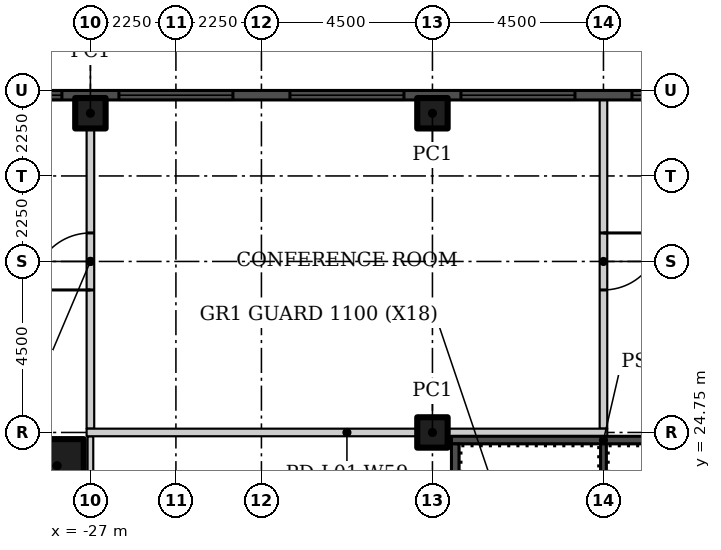
"""IFC4 building model, lengths in metres.
Left out: names, types, materials, properties, quantities, classifications, styles, units other than length and angle.
Written with IfcOpenShell. Run it as: python <this file> out.ifc"""

import sys

from ifc_helpers import new_model, si_unit, direction, frame, frame_2d, origin, origin_2d, place, context, subcontext, project, spatial, rectangle, hollow_rectangle, extrude, element, fill, save


model = new_model("IFC4")
c1 = context("Model", 3, precision=1e-05, world=origin(), true_north=direction((0.0, 1.0)))
c2 = subcontext(c1, "Body", "Model", "MODEL_VIEW")
j1 = project(units=[si_unit("LENGTHUNIT", "METRE"), si_unit("PLANEANGLEUNIT", "RADIAN")], contexts=[c1])
p1 = place(None, origin())
s1 = spatial("IfcSite", under=j1, at=p1, CompositionType="ELEMENT")
p2 = place(p1, origin())
s2 = spatial("IfcBuilding", under=s1, at=p2, CompositionType="ELEMENT")
p3 = place(p2, frame((0.0, 0.0, 6.5)))
s3 = spatial("IfcBuildingStorey", under=s2, at=p3, CompositionType="ELEMENT", Elevation=6.5)
p4 = place(p3, frame((-27.875, 23.875, 0.0)))
e1 = element("IfcColumn", 1, at=p4, inside=s3, PredefinedType="COLUMN", context=c2, shape_type="SweptSolid", body=[
    extrude(hollow_rectangle(XDim=1.4, YDim=1.4, WallThickness=0.06, at=origin_2d()), origin(), (0.0, 0.0, 1.0), 5.6),
])
for number, where in (
    (2, (-27.0, 33.15, 0.0)),
    (3, (-18.0, 24.75, 0.0)),
    (4, (-18.0, 33.15, 0.0)),
):
    element("IfcColumn", number, at=place(p3, frame(where)), inside=s3, PredefinedType="COLUMN", context=c2, shape_type="SweptSolid", body=[
        extrude(hollow_rectangle(XDim=0.8, YDim=0.8, WallThickness=0.03, at=origin_2d()), origin(), (0.0, 0.0, 1.0), 5.6),
    ])
p5 = place(p3, frame((-27.0, 6.75, 0.0), z_axis=(0.0, 0.0, 1.0), x_axis=(0.0, 1.0, 0.0)))
e5 = element("IfcWall", 5, at=p5, inside=s3, PredefinedType="PARTITIONING", context=c2, shape_type="SweptSolid", body=[
    extrude(rectangle(XDim=17.9, YDim=0.15, at=frame_2d((8.95, 0.0))), origin(), (0.0, 0.0, 1.0), 5.6),
])
p6 = place(p5, frame((2.1, 0.0, 0.0)))
e6 = element("IfcOpeningElement", 6, at=p6, cuts=e5, PredefinedType="OPENING", context=c2, shape_type="SweptSolid", body=[
    extrude(rectangle(XDim=1.5, YDim=2.1, at=frame_2d((0.75, 1.05))), frame((0.0, 0.085, 0.0), z_axis=(0.0, -1.0, 0.0), x_axis=(1.0, 0.0, 0.0)), (0.0, 0.0, 1.0), 0.17),
])
p7 = place(p5, frame((14.85, 0.0, 0.0)))
e7 = element("IfcOpeningElement", 7, at=p7, cuts=e5, PredefinedType="OPENING", context=c2, shape_type="SweptSolid", body=[
    extrude(rectangle(XDim=1.5, YDim=2.1, at=frame_2d((0.75, 1.05))), frame((0.0, 0.085, 0.0), z_axis=(0.0, -1.0, 0.0), x_axis=(1.0, 0.0, 0.0)), (0.0, 0.0, 1.0), 0.17),
])
p8 = place(p3, frame((-27.0, 24.85, 0.0), z_axis=(0.0, 0.0, 1.0), x_axis=(0.0, 1.0, 0.0)))
e8 = element("IfcWall", 8, at=p8, inside=s3, PredefinedType="PARTITIONING", context=c2, shape_type="SweptSolid", body=[
    extrude(rectangle(XDim=8.805, YDim=0.2, at=frame_2d((4.402, 0.0))), origin(), (0.0, 0.0, 1.0), 5.6),
])
p9 = place(p8, frame((3.65, 0.0, 0.0)))
e9 = element("IfcOpeningElement", 9, at=p9, cuts=e8, PredefinedType="OPENING", context=c2, shape_type="SweptSolid", body=[
    extrude(rectangle(XDim=1.5, YDim=2.4, at=frame_2d((0.75, 1.2))), frame((0.0, 0.11, 0.0), z_axis=(0.0, -1.0, 0.0), x_axis=(1.0, 0.0, 0.0)), (0.0, 0.0, 1.0), 0.22),
])
p10 = place(p3, frame((-13.5, 33.655, 0.0), z_axis=(0.0, 0.0, 1.0), x_axis=(0.0, -1.0, 0.0)))
e10 = element("IfcWall", 10, at=p10, inside=s3, PredefinedType="PARTITIONING", context=c2, shape_type="SweptSolid", body=[
    extrude(rectangle(XDim=8.805, YDim=0.2, at=frame_2d((4.402, 0.0))), origin(), (0.0, 0.0, 1.0), 5.6),
])
p11 = place(p10, frame((3.655, 0.0, 0.0)))
e11 = element("IfcOpeningElement", 11, at=p11, cuts=e10, PredefinedType="OPENING", context=c2, shape_type="SweptSolid", body=[
    extrude(rectangle(XDim=1.5, YDim=2.4, at=frame_2d((0.75, 1.2))), frame((0.0, 0.11, 0.0), z_axis=(0.0, -1.0, 0.0), x_axis=(1.0, 0.0, 0.0)), (0.0, 0.0, 1.0), 0.22),
])
p12 = place(p3, frame((-13.4, 24.75, 0.0), z_axis=(0.0, 0.0, 1.0), x_axis=(-1.0, 0.0, 0.0)))
e12 = element("IfcWall", 12, at=p12, inside=s3, PredefinedType="PARTITIONING", context=c2, shape_type="SweptSolid", body=[
    extrude(rectangle(XDim=13.7, YDim=0.2, at=frame_2d((6.85, 0.0))), origin(), (0.0, 0.0, 1.0), 5.6),
])
p13 = place(p3, frame((-67.5, 33.625, -0.35)))
e13 = element("IfcWall", 13, at=p13, inside=s3, PredefinedType="SOLIDWALL", context=c2, shape_type="SweptSolid", body=[
    extrude(rectangle(XDim=130.5, YDim=0.25, at=frame_2d((65.25, 0.0))), origin(), (0.0, 0.0, 1.0), 6.0),
])
p14 = place(p13, frame((126.75, 0.0, 1.35)))
e14 = element("IfcOpeningElement", 14, at=p14, cuts=e13, PredefinedType="OPENING", context=c2, shape_type="SweptSolid", body=[
    extrude(rectangle(XDim=3.0, YDim=1.8, at=frame_2d((1.5, 0.9))), frame((0.0, 0.135, 0.0), z_axis=(0.0, -1.0, 0.0), x_axis=(1.0, 0.0, 0.0)), (0.0, 0.0, 1.0), 0.27),
])
p15 = place(p13, frame((122.25, 0.0, 1.35)))
e15 = element("IfcOpeningElement", 15, at=p15, cuts=e13, PredefinedType="OPENING", context=c2, shape_type="SweptSolid", body=[
    extrude(rectangle(XDim=3.0, YDim=1.8, at=frame_2d((1.5, 0.9))), frame((0.0, 0.135, 0.0), z_axis=(0.0, -1.0, 0.0), x_axis=(1.0, 0.0, 0.0)), (0.0, 0.0, 1.0), 0.27),
])
p16 = place(p13, frame((117.75, 0.0, 1.35)))
e16 = element("IfcOpeningElement", 16, at=p16, cuts=e13, PredefinedType="OPENING", context=c2, shape_type="SweptSolid", body=[
    extrude(rectangle(XDim=3.0, YDim=1.8, at=frame_2d((1.5, 0.9))), frame((0.0, 0.135, 0.0), z_axis=(0.0, -1.0, 0.0), x_axis=(1.0, 0.0, 0.0)), (0.0, 0.0, 1.0), 0.27),
])
p17 = place(p13, frame((113.25, 0.0, 1.35)))
e17 = element("IfcOpeningElement", 17, at=p17, cuts=e13, PredefinedType="OPENING", context=c2, shape_type="SweptSolid", body=[
    extrude(rectangle(XDim=3.0, YDim=1.8, at=frame_2d((1.5, 0.9))), frame((0.0, 0.135, 0.0), z_axis=(0.0, -1.0, 0.0), x_axis=(1.0, 0.0, 0.0)), (0.0, 0.0, 1.0), 0.27),
])
p18 = place(p13, frame((108.75, 0.0, 1.35)))
e18 = element("IfcOpeningElement", 18, at=p18, cuts=e13, PredefinedType="OPENING", context=c2, shape_type="SweptSolid", body=[
    extrude(rectangle(XDim=3.0, YDim=1.8, at=frame_2d((1.5, 0.9))), frame((0.0, 0.135, 0.0), z_axis=(0.0, -1.0, 0.0), x_axis=(1.0, 0.0, 0.0)), (0.0, 0.0, 1.0), 0.27),
])
p19 = place(p13, frame((104.25, 0.0, 1.35)))
e19 = element("IfcOpeningElement", 19, at=p19, cuts=e13, PredefinedType="OPENING", context=c2, shape_type="SweptSolid", body=[
    extrude(rectangle(XDim=3.0, YDim=1.8, at=frame_2d((1.5, 0.9))), frame((0.0, 0.135, 0.0), z_axis=(0.0, -1.0, 0.0), x_axis=(1.0, 0.0, 0.0)), (0.0, 0.0, 1.0), 0.27),
])
p20 = place(p13, frame((99.75, 0.0, 1.35)))
e20 = element("IfcOpeningElement", 20, at=p20, cuts=e13, PredefinedType="OPENING", context=c2, shape_type="SweptSolid", body=[
    extrude(rectangle(XDim=3.0, YDim=1.8, at=frame_2d((1.5, 0.9))), frame((0.0, 0.135, 0.0), z_axis=(0.0, -1.0, 0.0), x_axis=(1.0, 0.0, 0.0)), (0.0, 0.0, 1.0), 0.27),
])
p21 = place(p13, frame((95.25, 0.0, 1.35)))
e21 = element("IfcOpeningElement", 21, at=p21, cuts=e13, PredefinedType="OPENING", context=c2, shape_type="SweptSolid", body=[
    extrude(rectangle(XDim=3.0, YDim=1.8, at=frame_2d((1.5, 0.9))), frame((0.0, 0.135, 0.0), z_axis=(0.0, -1.0, 0.0), x_axis=(1.0, 0.0, 0.0)), (0.0, 0.0, 1.0), 0.27),
])
p22 = place(p13, frame((90.75, 0.0, 1.35)))
e22 = element("IfcOpeningElement", 22, at=p22, cuts=e13, PredefinedType="OPENING", context=c2, shape_type="SweptSolid", body=[
    extrude(rectangle(XDim=3.0, YDim=1.8, at=frame_2d((1.5, 0.9))), frame((0.0, 0.135, 0.0), z_axis=(0.0, -1.0, 0.0), x_axis=(1.0, 0.0, 0.0)), (0.0, 0.0, 1.0), 0.27),
])
p23 = place(p13, frame((86.25, 0.0, 1.35)))
e23 = element("IfcOpeningElement", 23, at=p23, cuts=e13, PredefinedType="OPENING", context=c2, shape_type="SweptSolid", body=[
    extrude(rectangle(XDim=3.0, YDim=1.8, at=frame_2d((1.5, 0.9))), frame((0.0, 0.135, 0.0), z_axis=(0.0, -1.0, 0.0), x_axis=(1.0, 0.0, 0.0)), (0.0, 0.0, 1.0), 0.27),
])
p24 = place(p13, frame((81.75, 0.0, 1.35)))
e24 = element("IfcOpeningElement", 24, at=p24, cuts=e13, PredefinedType="OPENING", context=c2, shape_type="SweptSolid", body=[
    extrude(rectangle(XDim=3.0, YDim=1.8, at=frame_2d((1.5, 0.9))), frame((0.0, 0.135, 0.0), z_axis=(0.0, -1.0, 0.0), x_axis=(1.0, 0.0, 0.0)), (0.0, 0.0, 1.0), 0.27),
])
p25 = place(p13, frame((77.25, 0.0, 1.35)))
e25 = element("IfcOpeningElement", 25, at=p25, cuts=e13, PredefinedType="OPENING", context=c2, shape_type="SweptSolid", body=[
    extrude(rectangle(XDim=3.0, YDim=1.8, at=frame_2d((1.5, 0.9))), frame((0.0, 0.135, 0.0), z_axis=(0.0, -1.0, 0.0), x_axis=(1.0, 0.0, 0.0)), (0.0, 0.0, 1.0), 0.27),
])
p26 = place(p13, frame((72.75, 0.0, 1.35)))
e26 = element("IfcOpeningElement", 26, at=p26, cuts=e13, PredefinedType="OPENING", context=c2, shape_type="SweptSolid", body=[
    extrude(rectangle(XDim=3.0, YDim=1.8, at=frame_2d((1.5, 0.9))), frame((0.0, 0.135, 0.0), z_axis=(0.0, -1.0, 0.0), x_axis=(1.0, 0.0, 0.0)), (0.0, 0.0, 1.0), 0.27),
])
p27 = place(p13, frame((68.25, 0.0, 1.35)))
e27 = element("IfcOpeningElement", 27, at=p27, cuts=e13, PredefinedType="OPENING", context=c2, shape_type="SweptSolid", body=[
    extrude(rectangle(XDim=3.0, YDim=1.8, at=frame_2d((1.5, 0.9))), frame((0.0, 0.135, 0.0), z_axis=(0.0, -1.0, 0.0), x_axis=(1.0, 0.0, 0.0)), (0.0, 0.0, 1.0), 0.27),
])
p28 = place(p13, frame((63.75, 0.0, 1.35)))
e28 = element("IfcOpeningElement", 28, at=p28, cuts=e13, PredefinedType="OPENING", context=c2, shape_type="SweptSolid", body=[
    extrude(rectangle(XDim=3.0, YDim=1.8, at=frame_2d((1.5, 0.9))), frame((0.0, 0.135, 0.0), z_axis=(0.0, -1.0, 0.0), x_axis=(1.0, 0.0, 0.0)), (0.0, 0.0, 1.0), 0.27),
])
p29 = place(p13, frame((59.25, 0.0, 1.35)))
e29 = element("IfcOpeningElement", 29, at=p29, cuts=e13, PredefinedType="OPENING", context=c2, shape_type="SweptSolid", body=[
    extrude(rectangle(XDim=3.0, YDim=1.8, at=frame_2d((1.5, 0.9))), frame((0.0, 0.135, 0.0), z_axis=(0.0, -1.0, 0.0), x_axis=(1.0, 0.0, 0.0)), (0.0, 0.0, 1.0), 0.27),
])
p30 = place(p13, frame((54.75, 0.0, 1.35)))
e30 = element("IfcOpeningElement", 30, at=p30, cuts=e13, PredefinedType="OPENING", context=c2, shape_type="SweptSolid", body=[
    extrude(rectangle(XDim=3.0, YDim=1.8, at=frame_2d((1.5, 0.9))), frame((0.0, 0.135, 0.0), z_axis=(0.0, -1.0, 0.0), x_axis=(1.0, 0.0, 0.0)), (0.0, 0.0, 1.0), 0.27),
])
p31 = place(p13, frame((50.25, 0.0, 1.35)))
e31 = element("IfcOpeningElement", 31, at=p31, cuts=e13, PredefinedType="OPENING", context=c2, shape_type="SweptSolid", body=[
    extrude(rectangle(XDim=3.0, YDim=1.8, at=frame_2d((1.5, 0.9))), frame((0.0, 0.135, 0.0), z_axis=(0.0, -1.0, 0.0), x_axis=(1.0, 0.0, 0.0)), (0.0, 0.0, 1.0), 0.27),
])
p32 = place(p13, frame((45.75, 0.0, 1.35)))
e32 = element("IfcOpeningElement", 32, at=p32, cuts=e13, PredefinedType="OPENING", context=c2, shape_type="SweptSolid", body=[
    extrude(rectangle(XDim=3.0, YDim=1.8, at=frame_2d((1.5, 0.9))), frame((0.0, 0.135, 0.0), z_axis=(0.0, -1.0, 0.0), x_axis=(1.0, 0.0, 0.0)), (0.0, 0.0, 1.0), 0.27),
])
p33 = place(p13, frame((41.25, 0.0, 1.35)))
e33 = element("IfcOpeningElement", 33, at=p33, cuts=e13, PredefinedType="OPENING", context=c2, shape_type="SweptSolid", body=[
    extrude(rectangle(XDim=3.0, YDim=1.8, at=frame_2d((1.5, 0.9))), frame((0.0, 0.135, 0.0), z_axis=(0.0, -1.0, 0.0), x_axis=(1.0, 0.0, 0.0)), (0.0, 0.0, 1.0), 0.27),
])
p34 = place(p13, frame((36.75, 0.0, 1.35)))
e34 = element("IfcOpeningElement", 34, at=p34, cuts=e13, PredefinedType="OPENING", context=c2, shape_type="SweptSolid", body=[
    extrude(rectangle(XDim=3.0, YDim=1.8, at=frame_2d((1.5, 0.9))), frame((0.0, 0.135, 0.0), z_axis=(0.0, -1.0, 0.0), x_axis=(1.0, 0.0, 0.0)), (0.0, 0.0, 1.0), 0.27),
])
p35 = place(p13, frame((32.25, 0.0, 1.35)))
e35 = element("IfcOpeningElement", 35, at=p35, cuts=e13, PredefinedType="OPENING", context=c2, shape_type="SweptSolid", body=[
    extrude(rectangle(XDim=3.0, YDim=1.8, at=frame_2d((1.5, 0.9))), frame((0.0, 0.135, 0.0), z_axis=(0.0, -1.0, 0.0), x_axis=(1.0, 0.0, 0.0)), (0.0, 0.0, 1.0), 0.27),
])
p36 = place(p13, frame((27.75, 0.0, 1.35)))
e36 = element("IfcOpeningElement", 36, at=p36, cuts=e13, PredefinedType="OPENING", context=c2, shape_type="SweptSolid", body=[
    extrude(rectangle(XDim=3.0, YDim=1.8, at=frame_2d((1.5, 0.9))), frame((0.0, 0.135, 0.0), z_axis=(0.0, -1.0, 0.0), x_axis=(1.0, 0.0, 0.0)), (0.0, 0.0, 1.0), 0.27),
])
p37 = place(p13, frame((23.25, 0.0, 1.35)))
e37 = element("IfcOpeningElement", 37, at=p37, cuts=e13, PredefinedType="OPENING", context=c2, shape_type="SweptSolid", body=[
    extrude(rectangle(XDim=3.0, YDim=1.8, at=frame_2d((1.5, 0.9))), frame((0.0, 0.135, 0.0), z_axis=(0.0, -1.0, 0.0), x_axis=(1.0, 0.0, 0.0)), (0.0, 0.0, 1.0), 0.27),
])
p38 = place(p13, frame((18.75, 0.0, 1.35)))
e38 = element("IfcOpeningElement", 38, at=p38, cuts=e13, PredefinedType="OPENING", context=c2, shape_type="SweptSolid", body=[
    extrude(rectangle(XDim=3.0, YDim=1.8, at=frame_2d((1.5, 0.9))), frame((0.0, 0.135, 0.0), z_axis=(0.0, -1.0, 0.0), x_axis=(1.0, 0.0, 0.0)), (0.0, 0.0, 1.0), 0.27),
])
p39 = place(p13, frame((14.25, 0.0, 1.35)))
e39 = element("IfcOpeningElement", 39, at=p39, cuts=e13, PredefinedType="OPENING", context=c2, shape_type="SweptSolid", body=[
    extrude(rectangle(XDim=3.0, YDim=1.8, at=frame_2d((1.5, 0.9))), frame((0.0, 0.135, 0.0), z_axis=(0.0, -1.0, 0.0), x_axis=(1.0, 0.0, 0.0)), (0.0, 0.0, 1.0), 0.27),
])
p40 = place(p13, frame((9.75, 0.0, 1.35)))
e40 = element("IfcOpeningElement", 40, at=p40, cuts=e13, PredefinedType="OPENING", context=c2, shape_type="SweptSolid", body=[
    extrude(rectangle(XDim=3.0, YDim=1.8, at=frame_2d((1.5, 0.9))), frame((0.0, 0.135, 0.0), z_axis=(0.0, -1.0, 0.0), x_axis=(1.0, 0.0, 0.0)), (0.0, 0.0, 1.0), 0.27),
])
p41 = place(p13, frame((5.25, 0.0, 1.35)))
e41 = element("IfcOpeningElement", 41, at=p41, cuts=e13, PredefinedType="OPENING", context=c2, shape_type="SweptSolid", body=[
    extrude(rectangle(XDim=3.0, YDim=1.8, at=frame_2d((1.5, 0.9))), frame((0.0, 0.135, 0.0), z_axis=(0.0, -1.0, 0.0), x_axis=(1.0, 0.0, 0.0)), (0.0, 0.0, 1.0), 0.27),
])
p42 = place(p13, frame((0.75, 0.0, 1.35)))
e42 = element("IfcOpeningElement", 42, at=p42, cuts=e13, PredefinedType="OPENING", context=c2, shape_type="SweptSolid", body=[
    extrude(rectangle(XDim=3.0, YDim=1.8, at=frame_2d((1.5, 0.9))), frame((0.0, 0.135, 0.0), z_axis=(0.0, -1.0, 0.0), x_axis=(1.0, 0.0, 0.0)), (0.0, 0.0, 1.0), 0.27),
])
p43 = place(p3, frame((-17.5, 24.55, 0.0)))
e43 = element("IfcWall", 43, at=p43, inside=s3, PredefinedType="SHEAR", context=c2, shape_type="SweptSolid", body=[
    extrude(rectangle(XDim=8.0, YDim=0.2, at=frame_2d((4.0, 0.0))), origin(), (0.0, 0.0, 1.0), 5.6),
])
p44 = place(p3, frame((-17.4, 16.05, 0.0), z_axis=(0.0, 0.0, 1.0), x_axis=(0.0, 1.0, 0.0)))
e44 = element("IfcWall", 44, at=p44, inside=s3, PredefinedType="SHEAR", context=c2, shape_type="SweptSolid", body=[
    extrude(rectangle(XDim=8.4, YDim=0.2, at=frame_2d((4.2, 0.0))), origin(), (0.0, 0.0, 1.0), 5.6),
])
p45 = place(p3, frame((-13.5, 16.05, 0.0), z_axis=(0.0, 0.0, 1.0), x_axis=(0.0, 1.0, 0.0)))
e45 = element("IfcWall", 45, at=p45, inside=s3, PredefinedType="SHEAR", context=c2, shape_type="SweptSolid", body=[
    extrude(rectangle(XDim=8.4, YDim=0.15, at=frame_2d((4.2, 0.0))), origin(), (0.0, 0.0, 1.0), 5.6),
])
p46 = place(p9, origin())
e46 = element("IfcDoor", 46, at=p46, inside=s3, OperationType="DOUBLE_DOOR_SINGLE_SWING", PredefinedType="DOOR", context=c2, shape_type="SweptSolid", body=[
    extrude(rectangle(XDim=1.5, YDim=2.4, at=frame_2d((0.75, 1.2))), frame((0.0, 0.025, 0.0), z_axis=(0.0, -1.0, 0.0), x_axis=(1.0, 0.0, 0.0)), (0.0, 0.0, 1.0), 0.05),
])
fill(e9, e46)
p47 = place(p11, origin())
e47 = element("IfcDoor", 47, at=p47, inside=s3, OperationType="DOUBLE_DOOR_SINGLE_SWING", PredefinedType="DOOR", context=c2, shape_type="SweptSolid", body=[
    extrude(rectangle(XDim=1.5, YDim=2.4, at=frame_2d((0.75, 1.2))), frame((0.0, 0.025, 0.0), z_axis=(0.0, -1.0, 0.0), x_axis=(1.0, 0.0, 0.0)), (0.0, 0.0, 1.0), 0.05),
])
fill(e11, e47)
p48 = place(p30, origin())
e48 = element("IfcWindow", 48, at=p48, inside=s3, PartitioningType="TRIPLE_PANEL_VERTICAL", PredefinedType="WINDOW", context=c2, shape_type="SweptSolid", body=[
    extrude(rectangle(XDim=3.0, YDim=1.8, at=frame_2d((1.5, 0.9))), frame((0.0, 0.03, 0.0), z_axis=(0.0, -1.0, 0.0), x_axis=(1.0, 0.0, 0.0)), (0.0, 0.0, 1.0), 0.06),
])
fill(e30, e48)
p49 = place(p31, origin())
e49 = element("IfcWindow", 49, at=p49, inside=s3, PartitioningType="TRIPLE_PANEL_VERTICAL", PredefinedType="WINDOW", context=c2, shape_type="SweptSolid", body=[
    extrude(rectangle(XDim=3.0, YDim=1.8, at=frame_2d((1.5, 0.9))), frame((0.0, 0.03, 0.0), z_axis=(0.0, -1.0, 0.0), x_axis=(1.0, 0.0, 0.0)), (0.0, 0.0, 1.0), 0.06),
])
fill(e31, e49)
p50 = place(p32, origin())
e50 = element("IfcWindow", 50, at=p50, inside=s3, PartitioningType="TRIPLE_PANEL_VERTICAL", PredefinedType="WINDOW", context=c2, shape_type="SweptSolid", body=[
    extrude(rectangle(XDim=3.0, YDim=1.8, at=frame_2d((1.5, 0.9))), frame((0.0, 0.03, 0.0), z_axis=(0.0, -1.0, 0.0), x_axis=(1.0, 0.0, 0.0)), (0.0, 0.0, 1.0), 0.06),
])
fill(e32, e50)
p51 = place(p33, origin())
e51 = element("IfcWindow", 51, at=p51, inside=s3, PartitioningType="TRIPLE_PANEL_VERTICAL", PredefinedType="WINDOW", context=c2, shape_type="SweptSolid", body=[
    extrude(rectangle(XDim=3.0, YDim=1.8, at=frame_2d((1.5, 0.9))), frame((0.0, 0.03, 0.0), z_axis=(0.0, -1.0, 0.0), x_axis=(1.0, 0.0, 0.0)), (0.0, 0.0, 1.0), 0.06),
])
fill(e33, e51)
p52 = place(p34, origin())
e52 = element("IfcWindow", 52, at=p52, inside=s3, PartitioningType="TRIPLE_PANEL_VERTICAL", PredefinedType="WINDOW", context=c2, shape_type="SweptSolid", body=[
    extrude(rectangle(XDim=3.0, YDim=1.8, at=frame_2d((1.5, 0.9))), frame((0.0, 0.03, 0.0), z_axis=(0.0, -1.0, 0.0), x_axis=(1.0, 0.0, 0.0)), (0.0, 0.0, 1.0), 0.06),
])
fill(e34, e52)
save(model, sys.argv[1])
